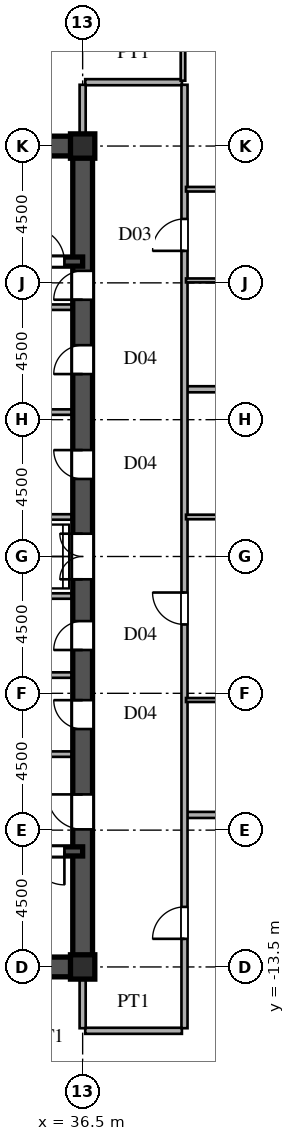
"""IFC4 building model, lengths in metres.
Left out: names, types, materials, properties, quantities, classifications, styles, units other than length and angle.
Written with IfcOpenShell. Run it as: python <this file> out.ifc"""

import sys

from ifc_helpers import new_model, si_unit, direction, frame, frame_2d, origin, origin_2d, place, context, subcontext, project, spatial, rectangle, i_section, extrude, source, transform, mapped, element, fill, save


model = new_model("IFC4")
c1 = context("Model", 3, precision=1e-05, world=origin(), true_north=direction((0.0, 1.0)))
c2 = subcontext(c1, "Body", "Model", "MODEL_VIEW")
j1 = project(units=[si_unit("LENGTHUNIT", "METRE"), si_unit("PLANEANGLEUNIT", "RADIAN")], contexts=[c1])
p1 = place(None, origin())
s1 = spatial("IfcSite", under=j1, at=p1, CompositionType="ELEMENT")
p2 = place(p1, origin())
s2 = spatial("IfcBuilding", under=s1, at=p2, CompositionType="ELEMENT")
p3 = place(p2, frame((0.0, 0.0, 69.3)))
s3 = spatial("IfcBuildingStorey", under=s2, at=p3, CompositionType="ELEMENT", Elevation=69.3)
m1 = source(origin(), c2, "Body", "SweptSolid", [
    extrude(i_section(OverallWidth=0.8, OverallDepth=0.8, WebThickness=0.032, FlangeThickness=0.05, at=origin_2d()), origin(), (0.0, 0.0, 1.0), 3.6),
])
for number, where, z_axis, x_axis in (
    (1, (36.5, -13.5, 0.0), (0.0, 0.0, 1.0), (1.0, 0.0, 0.0)),
    (2, (36.5, 13.5, 0.0), (0.0, 0.0, 1.0), (1.0, 0.0, 0.0)),
):
    element("IfcColumn", number, at=place(p3, frame(where, z_axis=z_axis, x_axis=x_axis)), inside=s3, PredefinedType="COLUMN", context=c2, shape_type="MappedRepresentation", body=[
        mapped(m1, transform((0.0, 0.0, 0.0), scale=1.0)),
    ])
for number, where, z_axis, x_axis in (
    (3, (27.5, -13.5, 0.0), (0.0, 0.0, 1.0), (1.0, 0.0, 0.0)),
    (4, (27.5, 13.5, 0.0), (0.0, 0.0, 1.0), (1.0, 0.0, 0.0)),
):
    element("IfcWall", number, at=place(p3, frame(where, z_axis=z_axis, x_axis=x_axis)), inside=s3, PredefinedType="SHEAR", context=c2, shape_type="SweptSolid", body=[
        extrude(rectangle(XDim=9.0, YDim=0.65, at=frame_2d((4.5, 0.0))), origin(), (0.0, 0.0, 1.0), 3.38),
    ])
p4 = place(p3, frame((36.5, -13.65, 0.0), z_axis=(0.0, 0.0, 1.0), x_axis=(0.0, 1.0, 0.0)))
e5 = element("IfcWall", 5, at=p4, inside=s3, PredefinedType="SHEAR", context=c2, shape_type="SweptSolid", body=[
    extrude(rectangle(XDim=7.15, YDim=0.65, at=frame_2d((3.575, 0.0))), origin(), (0.0, 0.0, 1.0), 3.38),
])
p5 = place(p4, frame((4.675, 0.0, 0.0)))
e6 = element("IfcOpeningElement", 6, at=p5, cuts=e5, PredefinedType="OPENING", context=c2, shape_type="SweptSolid", body=[
    extrude(rectangle(XDim=1.15, YDim=2.2, at=frame_2d((0.575, 1.1))), frame((0.0, 0.335, 0.0), z_axis=(0.0, -1.0, 0.0), x_axis=(1.0, 0.0, 0.0)), (0.0, 0.0, 1.0), 0.67),
])
p6 = place(p3, frame((36.5, -1.3, 0.0), z_axis=(0.0, 0.0, 1.0), x_axis=(0.0, 1.0, 0.0)))
e7 = element("IfcWall", 7, at=p6, inside=s3, PredefinedType="SHEAR", context=c2, shape_type="SweptSolid", body=[
    extrude(rectangle(XDim=2.6, YDim=0.65, at=frame_2d((1.3, 0.0))), origin(), (0.0, 0.0, 1.0), 3.38),
])
p7 = place(p6, frame((0.55, 0.0, 0.0)))
e8 = element("IfcOpeningElement", 8, at=p7, cuts=e7, PredefinedType="OPENING", context=c2, shape_type="SweptSolid", body=[
    extrude(rectangle(XDim=1.5, YDim=2.3, at=frame_2d((0.75, 1.15))), frame((0.0, 0.335, 0.0), z_axis=(0.0, -1.0, 0.0), x_axis=(1.0, 0.0, 0.0)), (0.0, 0.0, 1.0), 0.67),
])
p8 = place(p3, frame((36.5, 8.2, 0.0), z_axis=(0.0, 0.0, 1.0), x_axis=(0.0, 1.0, 0.0)))
e9 = element("IfcWall", 9, at=p8, inside=s3, PredefinedType="SHEAR", context=c2, shape_type="SweptSolid", body=[
    extrude(rectangle(XDim=5.45, YDim=0.65, at=frame_2d((2.725, 0.0))), origin(), (0.0, 0.0, 1.0), 3.38),
])
p9 = place(p8, frame((0.245, 0.0, 0.0)))
e10 = element("IfcOpeningElement", 10, at=p9, cuts=e9, PredefinedType="OPENING", context=c2, shape_type="SweptSolid", body=[
    extrude(rectangle(XDim=0.95, YDim=2.15, at=frame_2d((0.475, 1.075))), frame((0.0, 0.335, 0.0), z_axis=(0.0, -1.0, 0.0), x_axis=(1.0, 0.0, 0.0)), (0.0, 0.0, 1.0), 0.67),
])
p10 = place(p3, frame((36.5, -6.5, 0.0), z_axis=(0.0, 0.0, 1.0), x_axis=(0.0, 1.0, 0.0)))
e11 = element("IfcWall", 11, at=p10, inside=s3, PredefinedType="SHEAR", context=c2, shape_type="SweptSolid", body=[
    extrude(rectangle(XDim=2.6, YDim=0.65, at=frame_2d((1.3, 0.0))), origin(), (0.0, 0.0, 1.0), 3.38),
])
p11 = place(p10, frame((0.825, 0.0, 0.0)))
e12 = element("IfcOpeningElement", 12, at=p11, cuts=e11, PredefinedType="OPENING", context=c2, shape_type="SweptSolid", body=[
    extrude(rectangle(XDim=0.95, YDim=2.15, at=frame_2d((0.475, 1.075))), frame((0.0, 0.335, 0.0), z_axis=(0.0, -1.0, 0.0), x_axis=(1.0, 0.0, 0.0)), (0.0, 0.0, 1.0), 0.67),
])
p12 = place(p3, frame((36.5, -3.9, 0.0), z_axis=(0.0, 0.0, 1.0), x_axis=(0.0, 1.0, 0.0)))
e13 = element("IfcWall", 13, at=p12, inside=s3, PredefinedType="SHEAR", context=c2, shape_type="SweptSolid", body=[
    extrude(rectangle(XDim=2.6, YDim=0.65, at=frame_2d((1.3, 0.0))), origin(), (0.0, 0.0, 1.0), 3.38),
])
p13 = place(p12, frame((0.825, 0.0, 0.0)))
e14 = element("IfcOpeningElement", 14, at=p13, cuts=e13, PredefinedType="OPENING", context=c2, shape_type="SweptSolid", body=[
    extrude(rectangle(XDim=0.95, YDim=2.15, at=frame_2d((0.475, 1.075))), frame((0.0, 0.335, 0.0), z_axis=(0.0, -1.0, 0.0), x_axis=(1.0, 0.0, 0.0)), (0.0, 0.0, 1.0), 0.67),
])
p14 = place(p3, frame((36.5, 1.3, 0.0), z_axis=(0.0, 0.0, 1.0), x_axis=(0.0, 1.0, 0.0)))
e15 = element("IfcWall", 15, at=p14, inside=s3, PredefinedType="SHEAR", context=c2, shape_type="SweptSolid", body=[
    extrude(rectangle(XDim=3.45, YDim=0.65, at=frame_2d((1.725, 0.0))), origin(), (0.0, 0.0, 1.0), 3.38),
])
p15 = place(p14, frame((1.25, 0.0, 0.0)))
e16 = element("IfcOpeningElement", 16, at=p15, cuts=e15, PredefinedType="OPENING", context=c2, shape_type="SweptSolid", body=[
    extrude(rectangle(XDim=0.95, YDim=2.15, at=frame_2d((0.475, 1.075))), frame((0.0, 0.335, 0.0), z_axis=(0.0, -1.0, 0.0), x_axis=(1.0, 0.0, 0.0)), (0.0, 0.0, 1.0), 0.67),
])
p16 = place(p3, frame((36.5, 4.75, 0.0), z_axis=(0.0, 0.0, 1.0), x_axis=(0.0, 1.0, 0.0)))
e17 = element("IfcWall", 17, at=p16, inside=s3, PredefinedType="SHEAR", context=c2, shape_type="SweptSolid", body=[
    extrude(rectangle(XDim=3.45, YDim=0.65, at=frame_2d((1.725, 0.0))), origin(), (0.0, 0.0, 1.0), 3.38),
])
p17 = place(p16, frame((1.25, 0.0, 0.0)))
e18 = element("IfcOpeningElement", 18, at=p17, cuts=e17, PredefinedType="OPENING", context=c2, shape_type="SweptSolid", body=[
    extrude(rectangle(XDim=0.95, YDim=2.15, at=frame_2d((0.475, 1.075))), frame((0.0, 0.335, 0.0), z_axis=(0.0, -1.0, 0.0), x_axis=(1.0, 0.0, 0.0)), (0.0, 0.0, 1.0), 0.67),
])
p18 = place(p3, frame((27.5, -9.7, 0.0), z_axis=(0.0, 0.0, 1.0), x_axis=(1.0, 0.0, 0.0)))
e19 = element("IfcWall", 19, at=p18, inside=s3, PredefinedType="SHEAR", context=c2, shape_type="SweptSolid", body=[
    extrude(rectangle(XDim=9.0, YDim=0.3, at=frame_2d((4.5, 0.0))), origin(), (0.0, 0.0, 1.0), 3.38),
])
p19 = place(p18, frame((7.3, 0.0, 0.0)))
e20 = element("IfcOpeningElement", 20, at=p19, cuts=e19, PredefinedType="OPENING", context=c2, shape_type="SweptSolid", body=[
    extrude(rectangle(XDim=1.1, YDim=2.2, at=frame_2d((0.55, 1.1))), frame((0.0, 0.16, 0.0), z_axis=(0.0, -1.0, 0.0), x_axis=(1.0, 0.0, 0.0)), (0.0, 0.0, 1.0), 0.32),
])
p20 = place(p3, frame((27.5, 9.7, 0.0), z_axis=(0.0, 0.0, 1.0), x_axis=(1.0, 0.0, 0.0)))
e21 = element("IfcWall", 21, at=p20, inside=s3, PredefinedType="SHEAR", context=c2, shape_type="SweptSolid", body=[
    extrude(rectangle(XDim=9.0, YDim=0.3, at=frame_2d((4.5, 0.0))), origin(), (0.0, 0.0, 1.0), 3.38),
])
p21 = place(p20, frame((7.3, 0.0, 0.0)))
e22 = element("IfcOpeningElement", 22, at=p21, cuts=e21, PredefinedType="OPENING", context=c2, shape_type="SweptSolid", body=[
    extrude(rectangle(XDim=1.1, YDim=2.2, at=frame_2d((0.55, 1.1))), frame((0.0, 0.16, 0.0), z_axis=(0.0, -1.0, 0.0), x_axis=(1.0, 0.0, 0.0)), (0.0, 0.0, 1.0), 0.32),
])
for number, where, z_axis, x_axis in (
    (23, (30.45, -6.5, 0.0), (0.0, 0.0, 1.0), (1.0, 0.0, 0.0)),
    (24, (30.45, 8.2, 0.0), (0.0, 0.0, 1.0), (1.0, 0.0, 0.0)),
):
    element("IfcWall", number, at=place(p3, frame(where, z_axis=z_axis, x_axis=x_axis)), inside=s3, PredefinedType="PARTITIONING", context=c2, shape_type="SweptSolid", body=[
        extrude(rectangle(XDim=5.7, YDim=0.18, at=frame_2d((2.85, 0.0))), origin(), (0.0, 0.0, 1.0), 3.38),
    ])
for number, where, z_axis, x_axis in (
    (25, (33.2, -1.3, 0.0), (0.0, 0.0, 1.0), (1.0, 0.0, 0.0)),
    (26, (33.2, 1.3, 0.0), (0.0, 0.0, 1.0), (1.0, 0.0, 0.0)),
    (27, (33.2, -3.9, 0.0), (0.0, 0.0, 1.0), (1.0, 0.0, 0.0)),
    (28, (33.2, 4.75, 0.0), (0.0, 0.0, 1.0), (1.0, 0.0, 0.0)),
):
    element("IfcWall", number, at=place(p3, frame(where, z_axis=z_axis, x_axis=x_axis)), inside=s3, PredefinedType="PARTITIONING", context=c2, shape_type="SweptSolid", body=[
        extrude(rectangle(XDim=2.95, YDim=0.18, at=frame_2d((1.475, 0.0))), origin(), (0.0, 0.0, 1.0), 3.38),
    ])
p22 = place(p3, frame((36.585, -15.6, 0.0), z_axis=(0.0, 0.0, 1.0), x_axis=(1.0, 0.0, 0.0)))
e29 = element("IfcWall", 29, at=p22, inside=s3, PredefinedType="PARTITIONING", context=c2, shape_type="SweptSolid", body=[
    extrude(rectangle(XDim=3.18, YDim=0.2, at=frame_2d((1.59, 0.0))), origin(), (0.0, 0.0, 1.0), 3.38),
])
p23 = place(p3, frame((39.93, -8.5, 0.0), z_axis=(0.0, 0.0, 1.0), x_axis=(1.0, 0.0, 0.0)))
e30 = element("IfcWall", 30, at=p23, inside=s3, PredefinedType="PARTITIONING", context=c2, shape_type="SweptSolid", body=[
    extrude(rectangle(XDim=28.86, YDim=0.2, at=frame_2d((14.43, 0.0))), origin(), (0.0, 0.0, 1.0), 3.38),
])
p24 = place(p3, frame((39.9, -4.72, 0.0), z_axis=(0.0, 0.0, 1.0), x_axis=(1.0, 0.0, 0.0)))
e31 = element("IfcWall", 31, at=p24, inside=s3, PredefinedType="PARTITIONING", context=c2, shape_type="SweptSolid", body=[
    extrude(rectangle(XDim=5.55, YDim=0.13, at=frame_2d((2.775, 0.0))), origin(), (0.0, 0.0, 1.0), 3.38),
])
p25 = place(p24, frame((2.335, 0.0, 0.0)))
e32 = element("IfcOpeningElement", 32, at=p25, cuts=e31, PredefinedType="OPENING", context=c2, shape_type="SweptSolid", body=[
    extrude(rectangle(XDim=0.88, YDim=2.1, at=frame_2d((0.44, 1.05))), frame((0.0, 0.075, 0.0), z_axis=(0.0, -1.0, 0.0), x_axis=(1.0, 0.0, 0.0)), (0.0, 0.0, 1.0), 0.15),
])
p26 = place(p3, frame((39.9, 1.3, 0.0), z_axis=(0.0, 0.0, 1.0), x_axis=(1.0, 0.0, 0.0)))
e33 = element("IfcWall", 33, at=p26, inside=s3, PredefinedType="PARTITIONING", context=c2, shape_type="SweptSolid", body=[
    extrude(rectangle(XDim=5.55, YDim=0.15, at=frame_2d((2.775, 0.0))), origin(), (0.0, 0.0, 1.0), 3.38),
])
p27 = place(p26, frame((2.3, 0.0, 0.0)))
e34 = element("IfcOpeningElement", 34, at=p27, cuts=e33, PredefinedType="OPENING", context=c2, shape_type="SweptSolid", body=[
    extrude(rectangle(XDim=0.95, YDim=2.15, at=frame_2d((0.475, 1.075))), frame((0.0, 0.085, 0.0), z_axis=(0.0, -1.0, 0.0), x_axis=(1.0, 0.0, 0.0)), (0.0, 0.0, 1.0), 0.17),
])
p28 = place(p3, frame((39.93, 5.5, 0.0), z_axis=(0.0, 0.0, 1.0), x_axis=(1.0, 0.0, 0.0)))
e35 = element("IfcWall", 35, at=p28, inside=s3, PredefinedType="PARTITIONING", context=c2, shape_type="SweptSolid", body=[
    extrude(rectangle(XDim=31.075, YDim=0.2, at=frame_2d((15.538, 0.0))), origin(), (0.0, 0.0, 1.0), 3.38),
])
p29 = place(p3, frame((39.9, 9.08, 0.0), z_axis=(0.0, 0.0, 1.0), x_axis=(1.0, 0.0, 0.0)))
e36 = element("IfcWall", 36, at=p29, inside=s3, PredefinedType="PARTITIONING", context=c2, shape_type="SweptSolid", body=[
    extrude(rectangle(XDim=5.55, YDim=0.13, at=frame_2d((2.775, 0.0))), origin(), (0.0, 0.0, 1.0), 3.38),
])
p30 = place(p29, frame((2.335, 0.0, 0.0)))
e37 = element("IfcOpeningElement", 37, at=p30, cuts=e36, PredefinedType="OPENING", context=c2, shape_type="SweptSolid", body=[
    extrude(rectangle(XDim=0.88, YDim=2.1, at=frame_2d((0.44, 1.05))), frame((0.0, 0.075, 0.0), z_axis=(0.0, -1.0, 0.0), x_axis=(1.0, 0.0, 0.0)), (0.0, 0.0, 1.0), 0.15),
])
p31 = place(p3, frame((39.9, 12.08, 0.0), z_axis=(0.0, 0.0, 1.0), x_axis=(1.0, 0.0, 0.0)))
e38 = element("IfcWall", 38, at=p31, inside=s3, PredefinedType="PARTITIONING", context=c2, shape_type="SweptSolid", body=[
    extrude(rectangle(XDim=5.55, YDim=0.15, at=frame_2d((2.775, 0.0))), origin(), (0.0, 0.0, 1.0), 3.38),
])
p32 = place(p31, frame((2.3, 0.0, 0.0)))
e39 = element("IfcOpeningElement", 39, at=p32, cuts=e38, PredefinedType="OPENING", context=c2, shape_type="SweptSolid", body=[
    extrude(rectangle(XDim=0.95, YDim=2.15, at=frame_2d((0.475, 1.075))), frame((0.0, 0.085, 0.0), z_axis=(0.0, -1.0, 0.0), x_axis=(1.0, 0.0, 0.0)), (0.0, 0.0, 1.0), 0.17),
])
p33 = place(p3, frame((36.585, 15.6, 0.0), z_axis=(0.0, 0.0, 1.0), x_axis=(1.0, 0.0, 0.0)))
e40 = element("IfcWall", 40, at=p33, inside=s3, PredefinedType="PARTITIONING", context=c2, shape_type="SweptSolid", body=[
    extrude(rectangle(XDim=3.18, YDim=0.2, at=frame_2d((1.59, 0.0))), origin(), (0.0, 0.0, 1.0), 3.38),
])
for number, where, z_axis, x_axis in (
    (41, (36.5, -15.515, 0.0), (0.0, 0.0, 1.0), (0.0, 1.0, 0.0)),
    (42, (36.5, 13.83, 0.0), (0.0, 0.0, 1.0), (0.0, 1.0, 0.0)),
):
    element("IfcWall", number, at=place(p3, frame(where, z_axis=z_axis, x_axis=x_axis)), inside=s3, PredefinedType="PARTITIONING", context=c2, shape_type="SweptSolid", body=[
        extrude(rectangle(XDim=1.685, YDim=0.2, at=frame_2d((0.842, 0.0))), origin(), (0.0, 0.0, 1.0), 2.68),
    ])
p34 = place(p3, frame((39.8, 15.65, 0.0), z_axis=(0.0, 0.0, 1.0), x_axis=(0.0, 1.0, 0.0)))
e43 = element("IfcWall", 43, at=p34, inside=s3, PredefinedType="PARTITIONING", context=c2, shape_type="SweptSolid", body=[
    extrude(rectangle(XDim=5.925, YDim=0.15, at=frame_2d((2.962, 0.0))), origin(), (0.0, 0.0, 1.0), 3.38),
])
p35 = place(p34, frame((2.029, 0.0, 0.0)))
e44 = element("IfcOpeningElement", 44, at=p35, cuts=e43, PredefinedType="OPENING", context=c2, shape_type="SweptSolid", body=[
    extrude(rectangle(XDim=0.95, YDim=2.15, at=frame_2d((0.475, 1.075))), frame((0.0, 0.085, 0.0), z_axis=(0.0, -1.0, 0.0), x_axis=(1.0, 0.0, 0.0)), (0.0, 0.0, 1.0), 0.17),
])
p36 = place(p3, frame((39.85, -15.515, 0.0), z_axis=(0.0, 0.0, 1.0), x_axis=(0.0, 1.0, 0.0)))
e45 = element("IfcWall", 45, at=p36, inside=s3, PredefinedType="PARTITIONING", context=c2, shape_type="SweptSolid", body=[
    extrude(rectangle(XDim=31.03, YDim=0.2, at=frame_2d((15.515, 0.0))), origin(), (0.0, 0.0, 1.0), 3.38),
])
p37 = place(p36, frame((2.94, 0.0, 0.0)))
e46 = element("IfcOpeningElement", 46, at=p37, cuts=e45, PredefinedType="OPENING", context=c2, shape_type="SweptSolid", body=[
    extrude(rectangle(XDim=1.05, YDim=2.25, at=frame_2d((0.525, 1.125))), frame((0.0, 0.11, 0.0), z_axis=(0.0, -1.0, 0.0), x_axis=(1.0, 0.0, 0.0)), (0.0, 0.0, 1.0), 0.22),
])
p38 = place(p36, frame((13.28, 0.0, 0.0)))
e47 = element("IfcOpeningElement", 47, at=p38, cuts=e45, PredefinedType="OPENING", context=c2, shape_type="SweptSolid", body=[
    extrude(rectangle(XDim=1.05, YDim=2.25, at=frame_2d((0.525, 1.125))), frame((0.0, 0.11, 0.0), z_axis=(0.0, -1.0, 0.0), x_axis=(1.0, 0.0, 0.0)), (0.0, 0.0, 1.0), 0.22),
])
p39 = place(p36, frame((25.567, 0.0, 0.0)))
e48 = element("IfcOpeningElement", 48, at=p39, cuts=e45, PredefinedType="OPENING", context=c2, shape_type="SweptSolid", body=[
    extrude(rectangle(XDim=1.05, YDim=2.25, at=frame_2d((0.525, 1.125))), frame((0.0, 0.11, 0.0), z_axis=(0.0, -1.0, 0.0), x_axis=(1.0, 0.0, 0.0)), (0.0, 0.0, 1.0), 0.22),
])
m2 = source(origin(), c2, "Body", "SweptSolid", [
    extrude(rectangle(XDim=1.15, YDim=2.2, at=frame_2d((0.575, 1.1))), frame((0.0, 0.025, 0.0), z_axis=(0.0, -1.0, 0.0), x_axis=(1.0, 0.0, 0.0)), (0.0, 0.0, 1.0), 0.05),
])
p40 = place(p5, origin())
e49 = element("IfcDoor", 49, at=p40, inside=s3, OperationType="SINGLE_SWING_RIGHT", PredefinedType="DOOR", context=c2, shape_type="MappedRepresentation", body=[
    mapped(m2, transform((0.0, 0.0, 0.0), scale=1.0)),
])
fill(e6, e49)
m3 = source(origin(), c2, "Body", "SweptSolid", [
    extrude(rectangle(XDim=1.5, YDim=2.3, at=frame_2d((0.75, 1.15))), frame((0.0, 0.025, 0.0), z_axis=(0.0, -1.0, 0.0), x_axis=(1.0, 0.0, 0.0)), (0.0, 0.0, 1.0), 0.05),
])
p41 = place(p7, origin())
e50 = element("IfcDoor", 50, at=p41, inside=s3, OperationType="DOUBLE_SWING_LEFT", PredefinedType="DOOR", context=c2, shape_type="MappedRepresentation", body=[
    mapped(m3, transform((0.0, 0.0, 0.0), scale=1.0)),
])
fill(e8, e50)
m4 = source(origin(), c2, "Body", "SweptSolid", [
    extrude(rectangle(XDim=0.95, YDim=2.15, at=frame_2d((0.475, 1.075))), frame((0.0, 0.025, 0.0), z_axis=(0.0, -1.0, 0.0), x_axis=(1.0, 0.0, 0.0)), (0.0, 0.0, 1.0), 0.05),
])
p42 = place(p9, origin())
e51 = element("IfcDoor", 51, at=p42, inside=s3, OperationType="SINGLE_SWING_LEFT", PredefinedType="DOOR", context=c2, shape_type="MappedRepresentation", body=[
    mapped(m4, transform((0.0, 0.0, 0.0), scale=1.0)),
])
fill(e10, e51)
p43 = place(p11, origin())
e52 = element("IfcDoor", 52, at=p43, inside=s3, OperationType="SINGLE_SWING_RIGHT", PredefinedType="DOOR", context=c2, shape_type="MappedRepresentation", body=[
    mapped(m4, transform((0.0, 0.0, 0.0), scale=1.0)),
])
fill(e12, e52)
p44 = place(p13, origin())
e53 = element("IfcDoor", 53, at=p44, inside=s3, OperationType="SINGLE_SWING_LEFT", PredefinedType="DOOR", context=c2, shape_type="MappedRepresentation", body=[
    mapped(m4, transform((0.0, 0.0, 0.0), scale=1.0)),
])
fill(e14, e53)
p45 = place(p15, origin())
e54 = element("IfcDoor", 54, at=p45, inside=s3, OperationType="SINGLE_SWING_RIGHT", PredefinedType="DOOR", context=c2, shape_type="MappedRepresentation", body=[
    mapped(m4, transform((0.0, 0.0, 0.0), scale=1.0)),
])
fill(e16, e54)
p46 = place(p17, origin())
e55 = element("IfcDoor", 55, at=p46, inside=s3, OperationType="SINGLE_SWING_LEFT", PredefinedType="DOOR", context=c2, shape_type="MappedRepresentation", body=[
    mapped(m4, transform((0.0, 0.0, 0.0), scale=1.0)),
])
fill(e18, e55)
m5 = source(origin(), c2, "Body", "SweptSolid", [
    extrude(rectangle(XDim=1.1, YDim=2.2, at=frame_2d((0.55, 1.1))), frame((0.0, 0.025, 0.0), z_axis=(0.0, -1.0, 0.0), x_axis=(1.0, 0.0, 0.0)), (0.0, 0.0, 1.0), 0.05),
])
p47 = place(p19, frame((1.1, 0.0, 0.0), z_axis=(0.0, 0.0, 1.0), x_axis=(-1.0, 0.0, 0.0)))
e56 = element("IfcDoor", 56, at=p47, inside=s3, OperationType="SINGLE_SWING_RIGHT", PredefinedType="DOOR", context=c2, shape_type="MappedRepresentation", body=[
    mapped(m5, transform((0.0, 0.0, 0.0), scale=1.0)),
])
fill(e20, e56)
p48 = place(p21, origin())
e57 = element("IfcDoor", 57, at=p48, inside=s3, OperationType="SINGLE_SWING_LEFT", PredefinedType="DOOR", context=c2, shape_type="MappedRepresentation", body=[
    mapped(m5, transform((0.0, 0.0, 0.0), scale=1.0)),
])
fill(e22, e57)
m6 = source(origin(), c2, "Body", "SweptSolid", [
    extrude(rectangle(XDim=1.05, YDim=2.25, at=frame_2d((0.525, 1.125))), frame((0.0, 0.025, 0.0), z_axis=(0.0, -1.0, 0.0), x_axis=(1.0, 0.0, 0.0)), (0.0, 0.0, 1.0), 0.05),
])
p49 = place(p37, origin())
e58 = element("IfcDoor", 58, at=p49, inside=s3, OperationType="SINGLE_SWING_LEFT", PredefinedType="DOOR", context=c2, shape_type="MappedRepresentation", body=[
    mapped(m6, transform((0.0, 0.0, 0.0), scale=1.0)),
])
fill(e46, e58)
p50 = place(p38, origin())
e59 = element("IfcDoor", 59, at=p50, inside=s3, OperationType="SINGLE_SWING_RIGHT", PredefinedType="DOOR", context=c2, shape_type="MappedRepresentation", body=[
    mapped(m6, transform((0.0, 0.0, 0.0), scale=1.0)),
])
fill(e47, e59)
p51 = place(p39, origin())
e60 = element("IfcDoor", 60, at=p51, inside=s3, OperationType="SINGLE_SWING_LEFT", PredefinedType="DOOR", context=c2, shape_type="MappedRepresentation", body=[
    mapped(m6, transform((0.0, 0.0, 0.0), scale=1.0)),
])
fill(e48, e60)
save(model, sys.argv[1])
